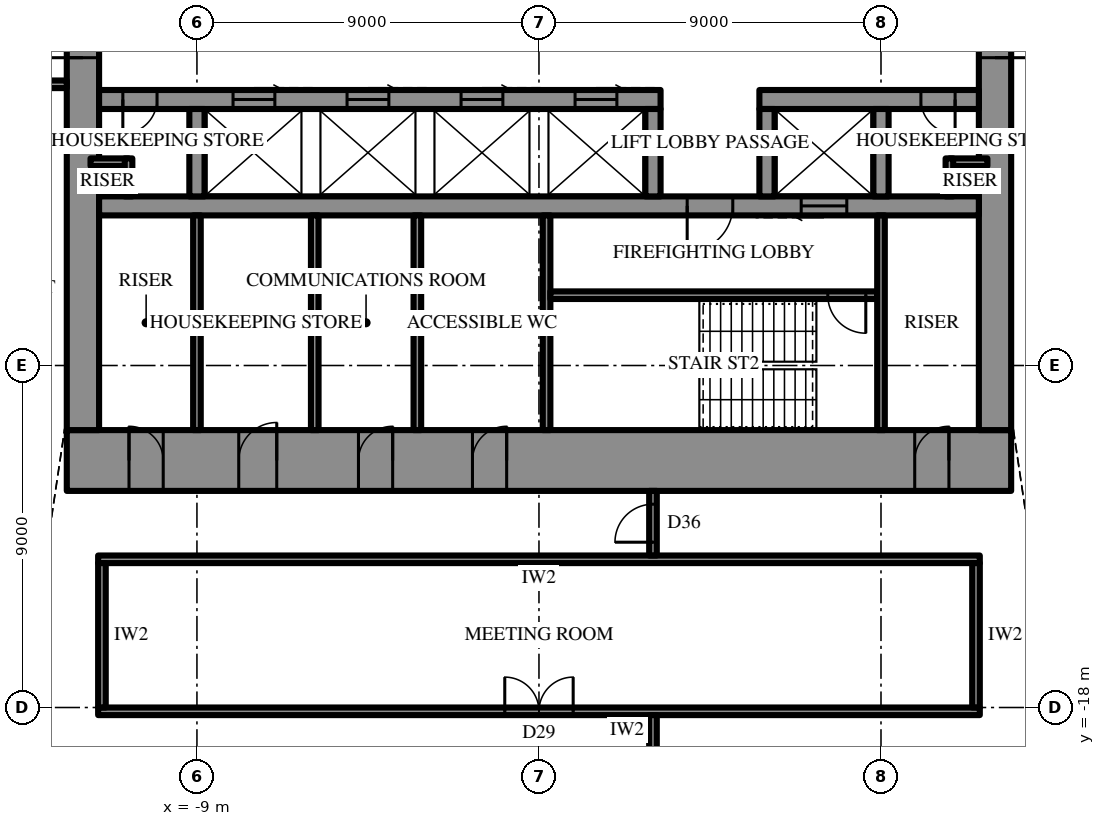
"""IFC4 building model, lengths in metres.
Left out: names, types, materials, properties, quantities, classifications, styles, units other than length and angle.
Written with IfcOpenShell. Run it as: python <this file> out.ifc"""

import sys

from ifc_helpers import new_model, si_unit, direction, frame, frame_2d, origin, place, context, subcontext, project, spatial, rectangle, extrude, element, fill, save


model = new_model("IFC4")
c1 = context("Model", 3, precision=1e-05, world=origin(), true_north=direction((0.0, 1.0)))
c2 = subcontext(c1, "Body", "Model", "MODEL_VIEW")
j1 = project(units=[si_unit("LENGTHUNIT", "METRE"), si_unit("PLANEANGLEUNIT", "RADIAN")], contexts=[c1])
p1 = place(None, origin())
s1 = spatial("IfcSite", under=j1, at=p1, CompositionType="ELEMENT")
p2 = place(p1, origin())
s2 = spatial("IfcBuilding", under=s1, at=p2, CompositionType="ELEMENT")
p3 = place(p2, frame((0.0, 0.0, 357.7)))
s3 = spatial("IfcBuildingStorey", under=s2, at=p3, CompositionType="ELEMENT", Elevation=357.7)
p4 = place(p3, frame((12.425, -11.5, 0.0), z_axis=(0.0, 0.0, 1.0), x_axis=(-1.0, 0.0, 0.0)))
e1 = element("IfcWall", 1, at=p4, inside=s3, PredefinedType="SHEAR", context=c2, shape_type="SweptSolid", body=[
    extrude(rectangle(XDim=24.85, YDim=1.6, at=frame_2d((12.425, 0.0))), origin(), (0.0, 0.0, 1.0), 4.2),
])
p5 = place(p4, frame((13.275, 0.0, 0.0)))
e2 = element("IfcOpeningElement", 2, at=p5, cuts=e1, PredefinedType="OPENING", context=c2, shape_type="SweptSolid", body=[
    extrude(rectangle(XDim=0.9, YDim=2.2, at=frame_2d((0.45, 1.1))), frame((0.0, 0.81, 0.0), z_axis=(0.0, -1.0, 0.0), x_axis=(1.0, 0.0, 0.0)), (0.0, 0.0, 1.0), 1.62),
])
p6 = place(p4, frame((16.275, 0.0, 0.0)))
e3 = element("IfcOpeningElement", 3, at=p6, cuts=e1, PredefinedType="OPENING", context=c2, shape_type="SweptSolid", body=[
    extrude(rectangle(XDim=0.9, YDim=2.2, at=frame_2d((0.45, 1.1))), frame((0.0, 0.81, 0.0), z_axis=(0.0, -1.0, 0.0), x_axis=(1.0, 0.0, 0.0)), (0.0, 0.0, 1.0), 1.62),
])
p7 = place(p4, frame((19.325, 0.0, 0.0)))
e4 = element("IfcOpeningElement", 4, at=p7, cuts=e1, PredefinedType="OPENING", context=c2, shape_type="SweptSolid", body=[
    extrude(rectangle(XDim=1.0, YDim=2.2, at=frame_2d((0.5, 1.1))), frame((0.0, 0.81, 0.0), z_axis=(0.0, -1.0, 0.0), x_axis=(1.0, 0.0, 0.0)), (0.0, 0.0, 1.0), 1.62),
])
p8 = place(p4, frame((1.637, 0.0, 0.0)))
e5 = element("IfcOpeningElement", 5, at=p8, cuts=e1, PredefinedType="OPENING", context=c2, shape_type="SweptSolid", body=[
    extrude(rectangle(XDim=0.9, YDim=2.2, at=frame_2d((0.45, 1.1))), frame((0.0, 0.81, 0.0), z_axis=(0.0, -1.0, 0.0), x_axis=(1.0, 0.0, 0.0)), (0.0, 0.0, 1.0), 1.62),
])
p9 = place(p4, frame((22.312, 0.0, 0.0)))
e6 = element("IfcOpeningElement", 6, at=p9, cuts=e1, PredefinedType="OPENING", context=c2, shape_type="SweptSolid", body=[
    extrude(rectangle(XDim=0.9, YDim=2.2, at=frame_2d((0.45, 1.1))), frame((0.0, 0.81, 0.0), z_axis=(0.0, -1.0, 0.0), x_axis=(1.0, 0.0, 0.0)), (0.0, 0.0, 1.0), 1.62),
])
p10 = place(p3, frame((12.0, -10.7, 0.0), z_axis=(0.0, 0.0, 1.0), x_axis=(0.0, 1.0, 0.0)))
e7 = element("IfcWall", 7, at=p10, inside=s3, PredefinedType="SHEAR", context=c2, shape_type="SweptSolid", body=[
    extrude(rectangle(XDim=21.4, YDim=0.85, at=frame_2d((10.7, 0.0))), origin(), (0.0, 0.0, 1.0), 4.2),
])
p11 = place(p10, frame((9.8, 0.0, 0.0)))
e8 = element("IfcOpeningElement", 8, at=p11, cuts=e7, PredefinedType="OPENING", context=c2, shape_type="SweptSolid", body=[
    extrude(rectangle(XDim=1.8, YDim=2.4, at=frame_2d((0.9, 1.2))), frame((0.0, 0.435, 0.0), z_axis=(0.0, -1.0, 0.0), x_axis=(1.0, 0.0, 0.0)), (0.0, 0.0, 1.0), 0.87),
])
p12 = place(p3, frame((-12.0, 10.7, 0.0), z_axis=(0.0, 0.0, 1.0), x_axis=(0.0, -1.0, 0.0)))
e9 = element("IfcWall", 9, at=p12, inside=s3, PredefinedType="SHEAR", context=c2, shape_type="SweptSolid", body=[
    extrude(rectangle(XDim=21.4, YDim=0.85, at=frame_2d((10.7, 0.0))), origin(), (0.0, 0.0, 1.0), 4.2),
])
p13 = place(p12, frame((9.8, 0.0, 0.0)))
e10 = element("IfcOpeningElement", 10, at=p13, cuts=e9, PredefinedType="OPENING", context=c2, shape_type="SweptSolid", body=[
    extrude(rectangle(XDim=1.8, YDim=2.4, at=frame_2d((0.9, 1.2))), frame((0.0, 0.435, 0.0), z_axis=(0.0, -1.0, 0.0), x_axis=(1.0, 0.0, 0.0)), (0.0, 0.0, 1.0), 0.87),
])
p14 = place(p3, frame((11.575, -2.0, 0.0), z_axis=(0.0, 0.0, 1.0), x_axis=(-1.0, 0.0, 0.0)))
e11 = element("IfcWall", 11, at=p14, inside=s3, PredefinedType="SHEAR", context=c2, shape_type="SweptSolid", body=[
    extrude(rectangle(XDim=5.775, YDim=0.5, at=frame_2d((2.887, 0.0))), origin(), (0.0, 0.0, 1.0), 4.2),
])
p15 = place(p14, frame((0.625, 0.0, 0.0)))
e12 = element("IfcOpeningElement", 12, at=p15, cuts=e11, PredefinedType="OPENING", context=c2, shape_type="SweptSolid", body=[
    extrude(rectangle(XDim=0.9, YDim=2.2, at=frame_2d((0.45, 1.1))), frame((0.0, 0.26, 0.0), z_axis=(0.0, -1.0, 0.0), x_axis=(1.0, 0.0, 0.0)), (0.0, 0.0, 1.0), 0.52),
])
p16 = place(p3, frame((3.2, -2.0, 0.0), z_axis=(0.0, 0.0, 1.0), x_axis=(-1.0, 0.0, 0.0)))
e13 = element("IfcWall", 13, at=p16, inside=s3, PredefinedType="SHEAR", context=c2, shape_type="SweptSolid", body=[
    extrude(rectangle(XDim=14.775, YDim=0.5, at=frame_2d((7.387, 0.0))), origin(), (0.0, 0.0, 1.0), 4.2),
])
p17 = place(p16, frame((13.25, 0.0, 0.0)))
e14 = element("IfcOpeningElement", 14, at=p17, cuts=e13, PredefinedType="OPENING", context=c2, shape_type="SweptSolid", body=[
    extrude(rectangle(XDim=0.9, YDim=2.2, at=frame_2d((0.45, 1.1))), frame((0.0, 0.26, 0.0), z_axis=(0.0, -1.0, 0.0), x_axis=(1.0, 0.0, 0.0)), (0.0, 0.0, 1.0), 0.52),
])
p18 = place(p16, frame((1.15, 0.0, 0.0)))
e15 = element("IfcOpeningElement", 15, at=p18, cuts=e13, PredefinedType="OPENING", context=c2, shape_type="SweptSolid", body=[
    extrude(rectangle(XDim=1.1, YDim=2.2, at=frame_2d((0.55, 1.1))), frame((0.0, 0.26, 0.0), z_axis=(0.0, -1.0, 0.0), x_axis=(1.0, 0.0, 0.0)), (0.0, 0.0, 1.0), 0.52),
])
p19 = place(p16, frame((4.15, 0.0, 0.0)))
e16 = element("IfcOpeningElement", 16, at=p19, cuts=e13, PredefinedType="OPENING", context=c2, shape_type="SweptSolid", body=[
    extrude(rectangle(XDim=1.1, YDim=2.2, at=frame_2d((0.55, 1.1))), frame((0.0, 0.26, 0.0), z_axis=(0.0, -1.0, 0.0), x_axis=(1.0, 0.0, 0.0)), (0.0, 0.0, 1.0), 0.52),
])
p20 = place(p16, frame((7.15, 0.0, 0.0)))
e17 = element("IfcOpeningElement", 17, at=p20, cuts=e13, PredefinedType="OPENING", context=c2, shape_type="SweptSolid", body=[
    extrude(rectangle(XDim=1.1, YDim=2.2, at=frame_2d((0.55, 1.1))), frame((0.0, 0.26, 0.0), z_axis=(0.0, -1.0, 0.0), x_axis=(1.0, 0.0, 0.0)), (0.0, 0.0, 1.0), 0.52),
])
p21 = place(p16, frame((10.15, 0.0, 0.0)))
e18 = element("IfcOpeningElement", 18, at=p21, cuts=e13, PredefinedType="OPENING", context=c2, shape_type="SweptSolid", body=[
    extrude(rectangle(XDim=1.1, YDim=2.2, at=frame_2d((0.55, 1.1))), frame((0.0, 0.26, 0.0), z_axis=(0.0, -1.0, 0.0), x_axis=(1.0, 0.0, 0.0)), (0.0, 0.0, 1.0), 0.52),
])
p22 = place(p3, frame((11.575, -4.8, 0.0), z_axis=(0.0, 0.0, 1.0), x_axis=(-1.0, 0.0, 0.0)))
e19 = element("IfcWall", 19, at=p22, inside=s3, PredefinedType="SHEAR", context=c2, shape_type="SweptSolid", body=[
    extrude(rectangle(XDim=23.15, YDim=0.5, at=frame_2d((11.575, 0.0))), origin(), (0.0, 0.0, 1.0), 4.2),
])
p23 = place(p22, frame((6.475, 0.0, 0.0)))
e20 = element("IfcOpeningElement", 20, at=p23, cuts=e19, PredefinedType="OPENING", context=c2, shape_type="SweptSolid", body=[
    extrude(rectangle(XDim=1.2, YDim=2.2, at=frame_2d((0.6, 1.1))), frame((0.0, 0.26, 0.0), z_axis=(0.0, -1.0, 0.0), x_axis=(1.0, 0.0, 0.0)), (0.0, 0.0, 1.0), 0.52),
])
p24 = place(p22, frame((3.475, 0.0, 0.0)))
e21 = element("IfcOpeningElement", 21, at=p24, cuts=e19, PredefinedType="OPENING", context=c2, shape_type="SweptSolid", body=[
    extrude(rectangle(XDim=1.2, YDim=2.2, at=frame_2d((0.6, 1.1))), frame((0.0, 0.26, 0.0), z_axis=(0.0, -1.0, 0.0), x_axis=(1.0, 0.0, 0.0)), (0.0, 0.0, 1.0), 0.52),
])
for number, where, z_axis, x_axis in (
    (22, (9.0, -2.25, 0.0), (0.0, 0.0, 1.0), (0.0, -1.0, 0.0)),
    (23, (6.0, -2.25, 0.0), (0.0, 0.0, 1.0), (0.0, -1.0, 0.0)),
    (24, (3.0, -2.25, 0.0), (0.0, 0.0, 1.0), (0.0, -1.0, 0.0)),
    (25, (-9.0, -2.25, 0.0), (0.0, 0.0, 1.0), (0.0, -1.0, 0.0)),
):
    element("IfcWall", number, at=place(p3, frame(where, z_axis=z_axis, x_axis=x_axis)), inside=s3, PredefinedType="SHEAR", context=c2, shape_type="SweptSolid", body=[
        extrude(rectangle(XDim=2.3, YDim=0.4, at=frame_2d((1.15, 0.0))), origin(), (0.0, 0.0, 1.0), 4.2),
    ])
p25 = place(p3, frame((0.2, -5.05, 0.0), z_axis=(0.0, 0.0, 1.0), x_axis=(0.0, -1.0, 0.0)))
e26 = element("IfcWall", 26, at=p25, inside=s3, PredefinedType="SHEAR", context=c2, shape_type="SweptSolid", body=[
    extrude(rectangle(XDim=5.65, YDim=0.2, at=frame_2d((2.825, 0.0))), origin(), (0.0, 0.0, 1.0), 4.2),
])
p26 = place(p3, frame((8.9, -7.15, 0.0), z_axis=(0.0, 0.0, 1.0), x_axis=(-1.0, 0.0, 0.0)))
e27 = element("IfcWall", 27, at=p26, inside=s3, PredefinedType="SHEAR", context=c2, shape_type="SweptSolid", body=[
    extrude(rectangle(XDim=8.6, YDim=0.2, at=frame_2d((4.3, 0.0))), origin(), (0.0, 0.0, 1.0), 4.2),
])
p27 = place(p26, frame((0.3, 0.0, 0.0)))
e28 = element("IfcOpeningElement", 28, at=p27, cuts=e27, PredefinedType="OPENING", context=c2, shape_type="SweptSolid", body=[
    extrude(rectangle(XDim=1.0, YDim=2.2, at=frame_2d((0.5, 1.1))), frame((0.0, 0.11, 0.0), z_axis=(0.0, -1.0, 0.0), x_axis=(1.0, 0.0, 0.0)), (0.0, 0.0, 1.0), 0.22),
])
for number, where, z_axis, x_axis in (
    (29, (9.0, -5.05, 0.0), (0.0, 0.0, 1.0), (0.0, -1.0, 0.0)),
    (30, (-9.0, -5.05, 0.0), (0.0, 0.0, 1.0), (0.0, -1.0, 0.0)),
    (31, (-3.2, -5.05, 0.0), (0.0, 0.0, 1.0), (0.0, -1.0, 0.0)),
    (32, (-5.9, -5.05, 0.0), (0.0, 0.0, 1.0), (0.0, -1.0, 0.0)),
):
    element("IfcWall", number, at=place(p3, frame(where, z_axis=z_axis, x_axis=x_axis)), inside=s3, PredefinedType="PARTITIONING", context=c2, shape_type="SweptSolid", body=[
        extrude(rectangle(XDim=5.65, YDim=0.2, at=frame_2d((2.825, 0.0))), origin(), (0.0, 0.0, 1.0), 4.0),
    ])
for number, where, z_axis, x_axis in (
    (33, (11.8, -3.65, 0.0), (0.0, 0.0, 1.0), (-1.0, 0.0, 0.0)),
    (34, (10.8, -3.55, 0.0), (0.0, 0.0, 1.0), (0.0, -1.0, 0.0)),
    (35, (-10.8, -3.65, 0.0), (0.0, 0.0, 1.0), (-1.0, 0.0, 0.0)),
    (36, (-10.8, -3.55, 0.0), (0.0, 0.0, 1.0), (0.0, -1.0, 0.0)),
):
    element("IfcWall", number, at=place(p3, frame(where, z_axis=z_axis, x_axis=x_axis)), inside=s3, PredefinedType="PARTITIONING", context=c2, shape_type="SweptSolid", body=[
        extrude(rectangle(XDim=1.0, YDim=0.2, at=frame_2d((0.5, 0.0))), origin(), (0.0, 0.0, 1.0), 4.0),
    ])
p28 = place(p3, frame((11.6, -14.1, 0.0), z_axis=(0.0, 0.0, 1.0), x_axis=(-1.0, 0.0, 0.0)))
e37 = element("IfcWall", 37, at=p28, inside=s3, PredefinedType="PARTITIONING", context=c2, shape_type="SweptSolid", body=[
    extrude(rectangle(XDim=23.2, YDim=0.2, at=frame_2d((11.6, 0.0))), origin(), (0.0, 0.0, 1.0), 4.0),
])
p29 = place(p3, frame((11.6, -18.1, 0.0), z_axis=(0.0, 0.0, 1.0), x_axis=(-1.0, 0.0, 0.0)))
e38 = element("IfcWall", 38, at=p29, inside=s3, PredefinedType="PARTITIONING", context=c2, shape_type="SweptSolid", body=[
    extrude(rectangle(XDim=23.2, YDim=0.2, at=frame_2d((11.6, 0.0))), origin(), (0.0, 0.0, 1.0), 4.0),
])
p30 = place(p29, frame((10.7, 0.0, 0.0)))
e39 = element("IfcOpeningElement", 39, at=p30, cuts=e38, PredefinedType="OPENING", context=c2, shape_type="SweptSolid", body=[
    extrude(rectangle(XDim=1.8, YDim=2.4, at=frame_2d((0.9, 1.2))), frame((0.0, 0.11, 0.0), z_axis=(0.0, -1.0, 0.0), x_axis=(1.0, 0.0, 0.0)), (0.0, 0.0, 1.0), 0.22),
])
for number, where, z_axis, x_axis in (
    (40, (11.5, -14.2, 0.0), (0.0, 0.0, 1.0), (0.0, -1.0, 0.0)),
    (41, (-11.5, -14.2, 0.0), (0.0, 0.0, 1.0), (0.0, -1.0, 0.0)),
):
    element("IfcWall", number, at=place(p3, frame(where, z_axis=z_axis, x_axis=x_axis)), inside=s3, PredefinedType="PARTITIONING", context=c2, shape_type="SweptSolid", body=[
        extrude(rectangle(XDim=3.8, YDim=0.2, at=frame_2d((1.9, 0.0))), origin(), (0.0, 0.0, 1.0), 4.0),
    ])
p31 = place(p3, frame((3.0, -12.3, 0.0), z_axis=(0.0, 0.0, 1.0), x_axis=(0.0, -1.0, 0.0)))
e42 = element("IfcWall", 42, at=p31, inside=s3, PredefinedType="PARTITIONING", context=c2, shape_type="SweptSolid", body=[
    extrude(rectangle(XDim=1.7, YDim=0.2, at=frame_2d((0.85, 0.0))), origin(), (0.0, 0.0, 1.0), 4.0),
])
p32 = place(p31, frame((0.35, 0.0, 0.0)))
e43 = element("IfcOpeningElement", 43, at=p32, cuts=e42, PredefinedType="OPENING", context=c2, shape_type="SweptSolid", body=[
    extrude(rectangle(XDim=1.0, YDim=2.2, at=frame_2d((0.5, 1.1))), frame((0.0, 0.11, 0.0), z_axis=(0.0, -1.0, 0.0), x_axis=(1.0, 0.0, 0.0)), (0.0, 0.0, 1.0), 0.22),
])
p33 = place(p3, frame((3.0, -18.2, 0.0), z_axis=(0.0, 0.0, 1.0), x_axis=(0.0, -1.0, 0.0)))
e44 = element("IfcWall", 44, at=p33, inside=s3, PredefinedType="PARTITIONING", context=c2, shape_type="SweptSolid", body=[
    extrude(rectangle(XDim=8.35, YDim=0.2, at=frame_2d((4.175, 0.0))), origin(), (0.0, 0.0, 1.0), 4.0),
])
p34 = place(p3, frame((-12.425, -1.6, 0.0), z_axis=(0.0, 0.0, 1.0), x_axis=(-1.0, 0.0, 0.0)))
e45 = element("IfcWall", 45, at=p34, inside=s3, PredefinedType="PARTITIONING", context=c2, shape_type="SweptSolid", body=[
    extrude(rectangle(XDim=16.5, YDim=0.2, at=frame_2d((8.25, 0.0))), origin(), (0.0, 0.0, 1.0), 4.0),
])
p35 = place(p34, frame((1.15, 0.0, 0.0)))
e46 = element("IfcOpeningElement", 46, at=p35, cuts=e45, PredefinedType="OPENING", context=c2, shape_type="SweptSolid", body=[
    extrude(rectangle(XDim=1.0, YDim=2.2, at=frame_2d((0.5, 1.1))), frame((0.0, 0.11, 0.0), z_axis=(0.0, -1.0, 0.0), x_axis=(1.0, 0.0, 0.0)), (0.0, 0.0, 1.0), 0.22),
])
p36 = place(p11, frame((1.8, 0.0, 0.0), z_axis=(0.0, 0.0, 1.0), x_axis=(-1.0, 0.0, 0.0)))
e47 = element("IfcDoor", 47, at=p36, inside=s3, OperationType="DOUBLE_DOOR_SINGLE_SWING", PredefinedType="DOOR", context=c2, shape_type="SweptSolid", body=[
    extrude(rectangle(XDim=1.8, YDim=2.4, at=frame_2d((0.9, 1.2))), frame((0.0, 0.025, 0.0), z_axis=(0.0, -1.0, 0.0), x_axis=(1.0, 0.0, 0.0)), (0.0, 0.0, 1.0), 0.05),
])
fill(e8, e47)
p37 = place(p13, frame((1.8, 0.0, 0.0), z_axis=(0.0, 0.0, 1.0), x_axis=(-1.0, 0.0, 0.0)))
e48 = element("IfcDoor", 48, at=p37, inside=s3, OperationType="DOUBLE_DOOR_SINGLE_SWING", PredefinedType="DOOR", context=c2, shape_type="SweptSolid", body=[
    extrude(rectangle(XDim=1.8, YDim=2.4, at=frame_2d((0.9, 1.2))), frame((0.0, 0.025, 0.0), z_axis=(0.0, -1.0, 0.0), x_axis=(1.0, 0.0, 0.0)), (0.0, 0.0, 1.0), 0.05),
])
fill(e10, e48)
p38 = place(p23, origin())
e49 = element("IfcDoor", 49, at=p38, inside=s3, OperationType="SINGLE_SWING_LEFT", PredefinedType="DOOR", context=c2, shape_type="SweptSolid", body=[
    extrude(rectangle(XDim=1.2, YDim=2.2, at=frame_2d((0.6, 1.1))), frame((0.0, 0.025, 0.0), z_axis=(0.0, -1.0, 0.0), x_axis=(1.0, 0.0, 0.0)), (0.0, 0.0, 1.0), 0.05),
])
fill(e20, e49)
p39 = place(p27, origin())
e50 = element("IfcDoor", 50, at=p39, inside=s3, OperationType="SINGLE_SWING_RIGHT", PredefinedType="DOOR", context=c2, shape_type="SweptSolid", body=[
    extrude(rectangle(XDim=1.0, YDim=2.2, at=frame_2d((0.5, 1.1))), frame((0.0, 0.025, 0.0), z_axis=(0.0, -1.0, 0.0), x_axis=(1.0, 0.0, 0.0)), (0.0, 0.0, 1.0), 0.05),
])
fill(e28, e50)
p40 = place(p5, frame((0.9, 0.0, 0.0), z_axis=(0.0, 0.0, 1.0), x_axis=(-1.0, 0.0, 0.0)))
e51 = element("IfcDoor", 51, at=p40, inside=s3, OperationType="SINGLE_SWING_LEFT", PredefinedType="DOOR", context=c2, shape_type="SweptSolid", body=[
    extrude(rectangle(XDim=0.9, YDim=2.2, at=frame_2d((0.45, 1.1))), frame((0.0, 0.025, 0.0), z_axis=(0.0, -1.0, 0.0), x_axis=(1.0, 0.0, 0.0)), (0.0, 0.0, 1.0), 0.05),
])
fill(e2, e51)
p41 = place(p6, frame((0.9, 0.0, 0.0), z_axis=(0.0, 0.0, 1.0), x_axis=(-1.0, 0.0, 0.0)))
e52 = element("IfcDoor", 52, at=p41, inside=s3, OperationType="SINGLE_SWING_LEFT", PredefinedType="DOOR", context=c2, shape_type="SweptSolid", body=[
    extrude(rectangle(XDim=0.9, YDim=2.2, at=frame_2d((0.45, 1.1))), frame((0.0, 0.025, 0.0), z_axis=(0.0, -1.0, 0.0), x_axis=(1.0, 0.0, 0.0)), (0.0, 0.0, 1.0), 0.05),
])
fill(e3, e52)
p42 = place(p7, frame((1.0, 0.0, 0.0), z_axis=(0.0, 0.0, 1.0), x_axis=(-1.0, 0.0, 0.0)))
e53 = element("IfcDoor", 53, at=p42, inside=s3, OperationType="SINGLE_SWING_LEFT", PredefinedType="DOOR", context=c2, shape_type="SweptSolid", body=[
    extrude(rectangle(XDim=1.0, YDim=2.2, at=frame_2d((0.5, 1.1))), frame((0.0, 0.025, 0.0), z_axis=(0.0, -1.0, 0.0), x_axis=(1.0, 0.0, 0.0)), (0.0, 0.0, 1.0), 0.05),
])
fill(e4, e53)
p43 = place(p8, frame((0.9, 0.0, 0.0), z_axis=(0.0, 0.0, 1.0), x_axis=(-1.0, 0.0, 0.0)))
e54 = element("IfcDoor", 54, at=p43, inside=s3, OperationType="SINGLE_SWING_LEFT", PredefinedType="DOOR", context=c2, shape_type="SweptSolid", body=[
    extrude(rectangle(XDim=0.9, YDim=2.2, at=frame_2d((0.45, 1.1))), frame((0.0, 0.025, 0.0), z_axis=(0.0, -1.0, 0.0), x_axis=(1.0, 0.0, 0.0)), (0.0, 0.0, 1.0), 0.05),
])
fill(e5, e54)
p44 = place(p9, frame((0.9, 0.0, 0.0), z_axis=(0.0, 0.0, 1.0), x_axis=(-1.0, 0.0, 0.0)))
e55 = element("IfcDoor", 55, at=p44, inside=s3, OperationType="SINGLE_SWING_RIGHT", PredefinedType="DOOR", context=c2, shape_type="SweptSolid", body=[
    extrude(rectangle(XDim=0.9, YDim=2.2, at=frame_2d((0.45, 1.1))), frame((0.0, 0.025, 0.0), z_axis=(0.0, -1.0, 0.0), x_axis=(1.0, 0.0, 0.0)), (0.0, 0.0, 1.0), 0.05),
])
fill(e6, e55)
p45 = place(p15, origin())
e56 = element("IfcDoor", 56, at=p45, inside=s3, OperationType="SINGLE_SWING_RIGHT", PredefinedType="DOOR", context=c2, shape_type="SweptSolid", body=[
    extrude(rectangle(XDim=0.9, YDim=2.2, at=frame_2d((0.45, 1.1))), frame((0.0, 0.025, 0.0), z_axis=(0.0, -1.0, 0.0), x_axis=(1.0, 0.0, 0.0)), (0.0, 0.0, 1.0), 0.05),
])
fill(e12, e56)
p46 = place(p17, origin())
e57 = element("IfcDoor", 57, at=p46, inside=s3, OperationType="SINGLE_SWING_LEFT", PredefinedType="DOOR", context=c2, shape_type="SweptSolid", body=[
    extrude(rectangle(XDim=0.9, YDim=2.2, at=frame_2d((0.45, 1.1))), frame((0.0, 0.025, 0.0), z_axis=(0.0, -1.0, 0.0), x_axis=(1.0, 0.0, 0.0)), (0.0, 0.0, 1.0), 0.05),
])
fill(e14, e57)
p47 = place(p24, origin())
e58 = element("IfcDoor", 58, at=p47, inside=s3, OperationType="SLIDING_TO_LEFT", PredefinedType="DOOR", context=c2, shape_type="SweptSolid", body=[
    extrude(rectangle(XDim=1.2, YDim=2.2, at=frame_2d((0.6, 1.1))), frame((0.0, 0.025, 0.0), z_axis=(0.0, -1.0, 0.0), x_axis=(1.0, 0.0, 0.0)), (0.0, 0.0, 1.0), 0.05),
])
fill(e21, e58)
p48 = place(p18, frame((1.1, 0.0, 0.0), z_axis=(0.0, 0.0, 1.0), x_axis=(-1.0, 0.0, 0.0)))
e59 = element("IfcDoor", 59, at=p48, inside=s3, OperationType="SLIDING_TO_LEFT", PredefinedType="DOOR", context=c2, shape_type="SweptSolid", body=[
    extrude(rectangle(XDim=1.1, YDim=2.2, at=frame_2d((0.55, 1.1))), frame((0.0, 0.025, 0.0), z_axis=(0.0, -1.0, 0.0), x_axis=(1.0, 0.0, 0.0)), (0.0, 0.0, 1.0), 0.05),
])
fill(e15, e59)
p49 = place(p19, frame((1.1, 0.0, 0.0), z_axis=(0.0, 0.0, 1.0), x_axis=(-1.0, 0.0, 0.0)))
e60 = element("IfcDoor", 60, at=p49, inside=s3, OperationType="SLIDING_TO_LEFT", PredefinedType="DOOR", context=c2, shape_type="SweptSolid", body=[
    extrude(rectangle(XDim=1.1, YDim=2.2, at=frame_2d((0.55, 1.1))), frame((0.0, 0.025, 0.0), z_axis=(0.0, -1.0, 0.0), x_axis=(1.0, 0.0, 0.0)), (0.0, 0.0, 1.0), 0.05),
])
fill(e16, e60)
p50 = place(p20, frame((1.1, 0.0, 0.0), z_axis=(0.0, 0.0, 1.0), x_axis=(-1.0, 0.0, 0.0)))
e61 = element("IfcDoor", 61, at=p50, inside=s3, OperationType="SLIDING_TO_LEFT", PredefinedType="DOOR", context=c2, shape_type="SweptSolid", body=[
    extrude(rectangle(XDim=1.1, YDim=2.2, at=frame_2d((0.55, 1.1))), frame((0.0, 0.025, 0.0), z_axis=(0.0, -1.0, 0.0), x_axis=(1.0, 0.0, 0.0)), (0.0, 0.0, 1.0), 0.05),
])
fill(e17, e61)
p51 = place(p21, frame((1.1, 0.0, 0.0), z_axis=(0.0, 0.0, 1.0), x_axis=(-1.0, 0.0, 0.0)))
e62 = element("IfcDoor", 62, at=p51, inside=s3, OperationType="SLIDING_TO_LEFT", PredefinedType="DOOR", context=c2, shape_type="SweptSolid", body=[
    extrude(rectangle(XDim=1.1, YDim=2.2, at=frame_2d((0.55, 1.1))), frame((0.0, 0.025, 0.0), z_axis=(0.0, -1.0, 0.0), x_axis=(1.0, 0.0, 0.0)), (0.0, 0.0, 1.0), 0.05),
])
fill(e18, e62)
p52 = place(p30, frame((1.8, 0.0, 0.0), z_axis=(0.0, 0.0, 1.0), x_axis=(-1.0, 0.0, 0.0)))
e63 = element("IfcDoor", 63, at=p52, inside=s3, OperationType="DOUBLE_DOOR_SINGLE_SWING", PredefinedType="DOOR", context=c2, shape_type="SweptSolid", body=[
    extrude(rectangle(XDim=1.8, YDim=2.4, at=frame_2d((0.9, 1.2))), frame((0.0, 0.025, 0.0), z_axis=(0.0, -1.0, 0.0), x_axis=(1.0, 0.0, 0.0)), (0.0, 0.0, 1.0), 0.05),
])
fill(e39, e63)
p53 = place(p32, frame((1.0, 0.0, 0.0), z_axis=(0.0, 0.0, 1.0), x_axis=(-1.0, 0.0, 0.0)))
e64 = element("IfcDoor", 64, at=p53, inside=s3, OperationType="SINGLE_SWING_RIGHT", PredefinedType="DOOR", context=c2, shape_type="SweptSolid", body=[
    extrude(rectangle(XDim=1.0, YDim=2.2, at=frame_2d((0.5, 1.1))), frame((0.0, 0.025, 0.0), z_axis=(0.0, -1.0, 0.0), x_axis=(1.0, 0.0, 0.0)), (0.0, 0.0, 1.0), 0.05),
])
fill(e43, e64)
save(model, sys.argv[1])
